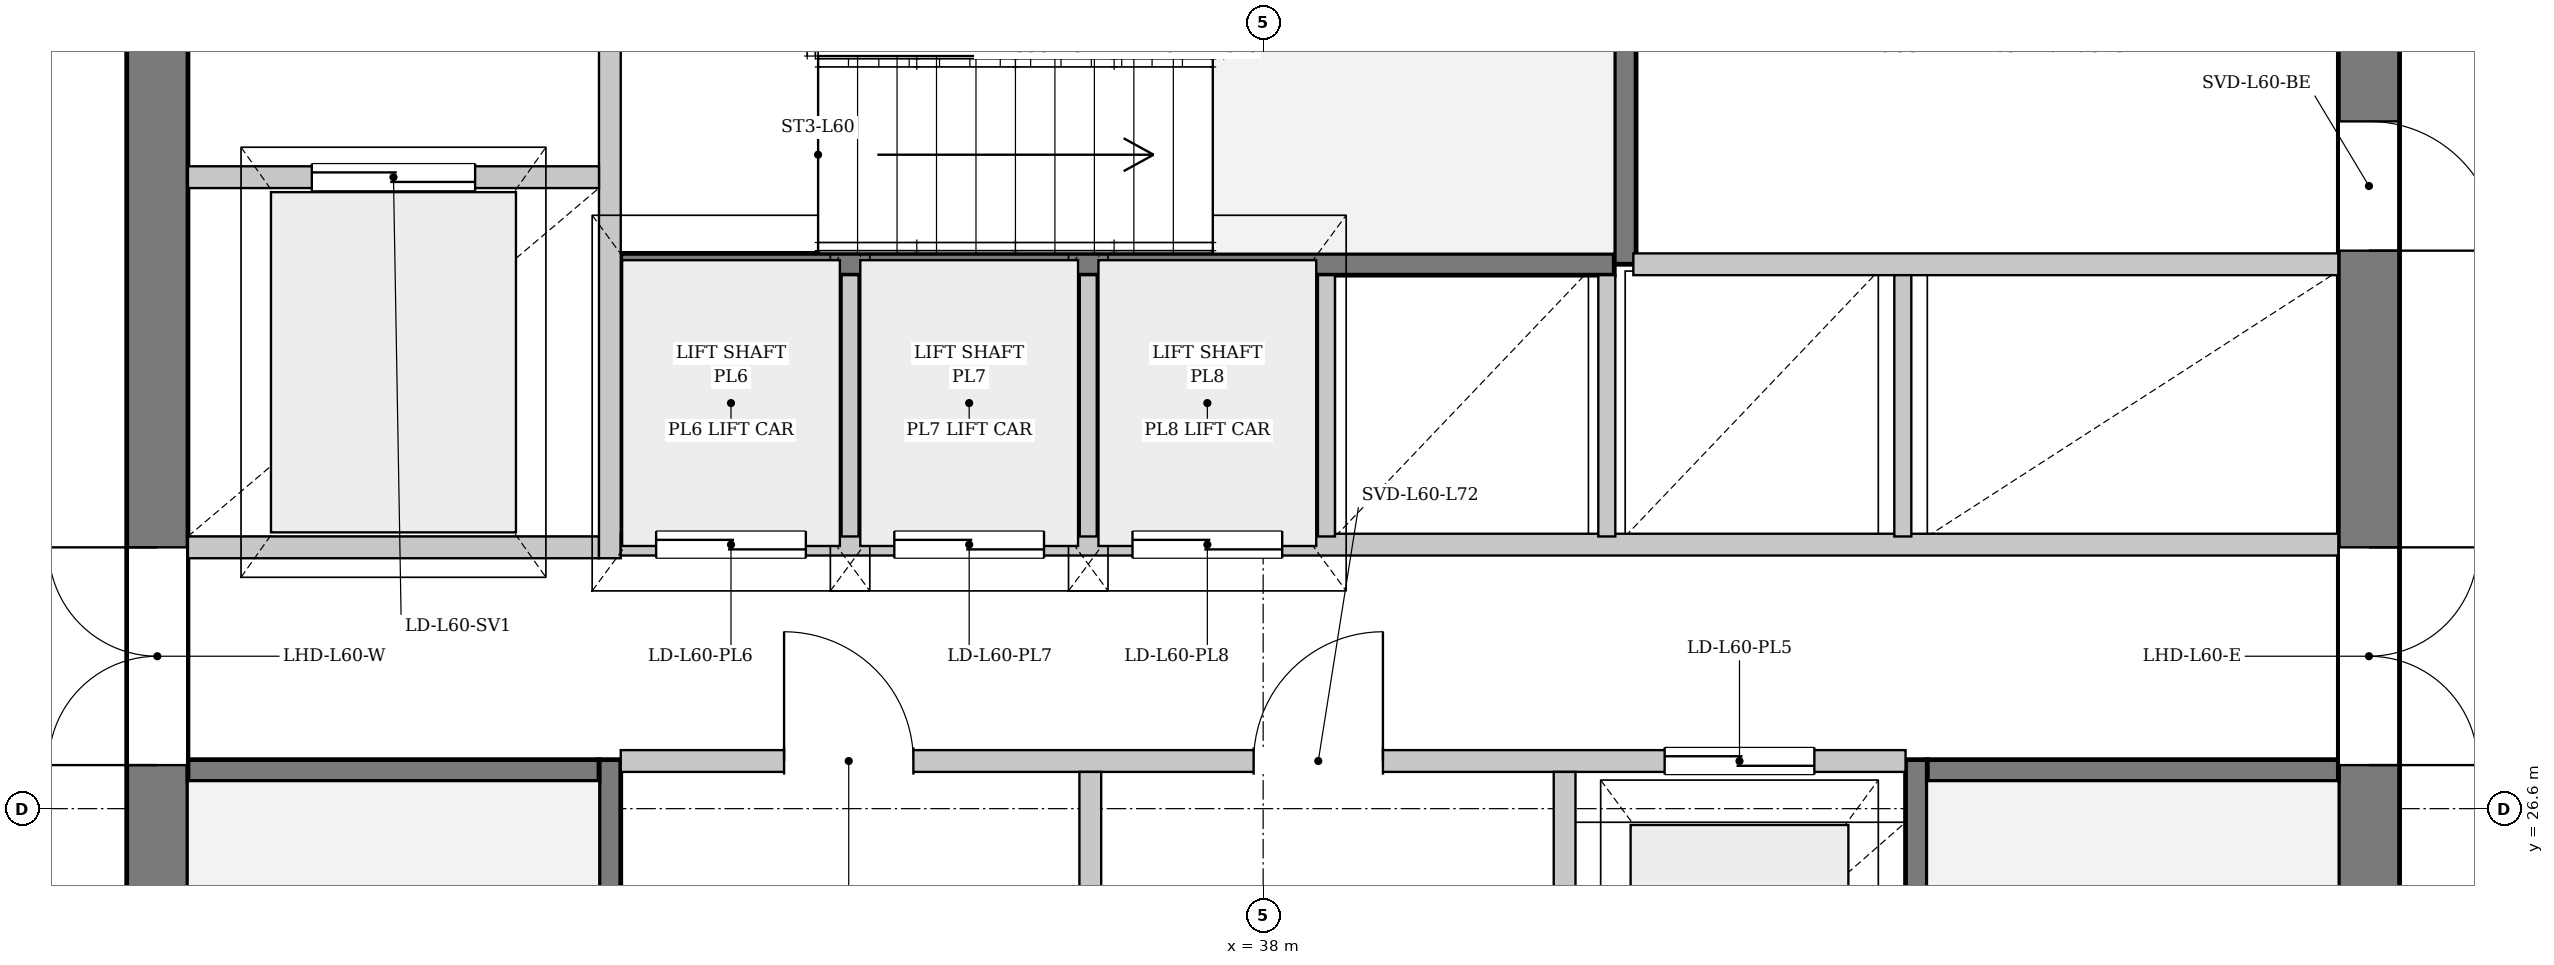
"""IFC4 building model, lengths in metres.
Left out: names, types, materials, properties, quantities, classifications, styles, units other than length and angle.
Written with IfcOpenShell. Run it as: python <this file> out.ifc"""

import sys

from ifc_helpers import new_model, si_unit, direction, frame, frame_2d, origin, place, context, subcontext, project, spatial, rectangle, extrude, source, transform, mapped, element, fill, save


model = new_model("IFC4")
c1 = context("Model", 3, precision=1e-05, world=origin(), true_north=direction((0.0, 1.0)))
c2 = subcontext(c1, "Body", "Model", "MODEL_VIEW")
j1 = project(units=[si_unit("LENGTHUNIT", "METRE"), si_unit("PLANEANGLEUNIT", "RADIAN")], contexts=[c1])
p1 = place(None, origin())
s1 = spatial("IfcSite", under=j1, at=p1, CompositionType="ELEMENT")
p2 = place(p1, origin())
s2 = spatial("IfcBuilding", under=s1, at=p2, CompositionType="ELEMENT")
p3 = place(p2, frame((0.0, 0.0, 227.35)))
s3 = spatial("IfcBuildingStorey", under=s2, at=p3, CompositionType="ELEMENT", Elevation=227.35)
p4 = place(p3, frame((15.539, 30.776, 0.0), z_axis=(0.0, 0.0, 1.0), x_axis=(0.876021364286, 0.482272297892, 0.0)))
e1 = element("IfcWall", 1, at=p4, inside=s3, PredefinedType="SOLIDWALL", context=c2, shape_type="SweptSolid", body=[
    extrude(rectangle(XDim=22.397, YDim=0.38, at=frame_2d((11.199, 0.0))), origin(), (0.0, 0.0, 1.0), 2.822),
])
p5 = place(p4, frame((5.671, 0.0, 0.65)))
e2 = element("IfcOpeningElement", 2, at=p5, cuts=e1, PredefinedType="OPENING", context=c2, shape_type="SweptSolid", body=[
    extrude(rectangle(XDim=1.2, YDim=1.5, at=frame_2d((0.6, 0.75))), frame((0.0, 0.2, 0.0), z_axis=(0.0, -1.0, 0.0), x_axis=(1.0, 0.0, 0.0)), (0.0, 0.0, 1.0), 0.4),
])
p6 = place(p4, frame((15.526, 0.0, 0.65)))
e3 = element("IfcOpeningElement", 3, at=p6, cuts=e1, PredefinedType="OPENING", context=c2, shape_type="SweptSolid", body=[
    extrude(rectangle(XDim=1.2, YDim=1.5, at=frame_2d((0.6, 0.75))), frame((0.0, 0.2, 0.0), z_axis=(0.0, -1.0, 0.0), x_axis=(1.0, 0.0, 0.0)), (0.0, 0.0, 1.0), 0.4),
])
p7 = place(p3, frame((29.875, 19.5, 0.0), z_axis=(0.0, 0.0, 1.0), x_axis=(0.0, 1.0, 0.0)))
e4 = element("IfcWall", 4, at=p7, inside=s3, PredefinedType="SHEAR", context=c2, shape_type="SweptSolid", body=[
    extrude(rectangle(XDim=14.2, YDim=0.45, at=frame_2d((7.1, 0.0))), origin(), (0.0, 0.0, 1.0), 3.33),
])
p8 = place(p7, frame((7.42, 0.0, 0.0)))
e5 = element("IfcOpeningElement", 5, at=p8, cuts=e4, PredefinedType="OPENING", context=c2, shape_type="SweptSolid", body=[
    extrude(rectangle(XDim=1.6, YDim=2.2, at=frame_2d((0.8, 1.1))), frame((0.0, 0.235, 0.0), z_axis=(0.0, -1.0, 0.0), x_axis=(1.0, 0.0, 0.0)), (0.0, 0.0, 1.0), 0.47),
])
p9 = place(p3, frame((46.125, 33.7, 0.0), z_axis=(0.0, 0.0, 1.0), x_axis=(0.0, -1.0, 0.0)))
e6 = element("IfcWall", 6, at=p9, inside=s3, PredefinedType="SHEAR", context=c2, shape_type="SweptSolid", body=[
    extrude(rectangle(XDim=14.2, YDim=0.45, at=frame_2d((7.1, 0.0))), origin(), (0.0, 0.0, 1.0), 3.33),
])
p10 = place(p9, frame((5.18, 0.0, 0.0)))
e7 = element("IfcOpeningElement", 7, at=p10, cuts=e6, PredefinedType="OPENING", context=c2, shape_type="SweptSolid", body=[
    extrude(rectangle(XDim=1.6, YDim=2.2, at=frame_2d((0.8, 1.1))), frame((0.0, 0.235, 0.0), z_axis=(0.0, -1.0, 0.0), x_axis=(1.0, 0.0, 0.0)), (0.0, 0.0, 1.0), 0.47),
])
p11 = place(p9, frame((2.05, 0.0, 0.0)))
e8 = element("IfcOpeningElement", 8, at=p11, cuts=e6, PredefinedType="OPENING", context=c2, shape_type="SweptSolid", body=[
    extrude(rectangle(XDim=0.95, YDim=2.1, at=frame_2d((0.475, 1.05))), frame((0.0, 0.235, 0.0), z_axis=(0.0, -1.0, 0.0), x_axis=(1.0, 0.0, 0.0)), (0.0, 0.0, 1.0), 0.47),
])
p12 = place(p3, frame((33.2, 19.5, 0.0), z_axis=(0.0, 0.0, 1.0), x_axis=(0.0, 1.0, 0.0)))
e9 = element("IfcWall", 9, at=p12, inside=s3, PredefinedType="PARTITIONING", context=c2, shape_type="SweptSolid", body=[
    extrude(rectangle(XDim=7.46, YDim=0.16, at=frame_2d((3.73, 0.0))), origin(), (0.0, 0.0, 1.0), 3.33),
])
p13 = place(p12, frame((0.08, 0.0, 0.0)))
e10 = element("IfcOpeningElement", 10, at=p13, cuts=e9, PredefinedType="OPENING", context=c2, shape_type="SweptSolid", body=[
    extrude(rectangle(XDim=1.32, YDim=2.2, at=frame_2d((0.66, 1.1))), frame((0.0, 0.09, 0.0), z_axis=(0.0, -1.0, 0.0), x_axis=(1.0, 0.0, 0.0)), (0.0, 0.0, 1.0), 0.18),
])
p14 = place(p3, frame((30.1, 26.88, 0.0), z_axis=(0.0, 0.0, 1.0), x_axis=(1.0, 0.0, 0.0)))
e11 = element("IfcWall", 11, at=p14, inside=s3, PredefinedType="PARTITIONING", context=c2, shape_type="SweptSolid", body=[
    extrude(rectangle(XDim=3.02, YDim=0.16, at=frame_2d((1.51, 0.0))), origin(), (0.0, 0.0, 1.0), 3.33),
])
p15 = place(p3, frame((42.8, 26.96, 0.0), z_axis=(0.0, 0.0, 1.0), x_axis=(0.0, -1.0, 0.0)))
e12 = element("IfcWall", 12, at=p15, inside=s3, PredefinedType="PARTITIONING", context=c2, shape_type="SweptSolid", body=[
    extrude(rectangle(XDim=7.46, YDim=0.16, at=frame_2d((3.73, 0.0))), origin(), (0.0, 0.0, 1.0), 3.33),
])
p16 = place(p15, frame((6.06, 0.0, 0.0)))
e13 = element("IfcOpeningElement", 13, at=p16, cuts=e12, PredefinedType="OPENING", context=c2, shape_type="SweptSolid", body=[
    extrude(rectangle(XDim=1.32, YDim=2.2, at=frame_2d((0.66, 1.1))), frame((0.0, 0.09, 0.0), z_axis=(0.0, -1.0, 0.0), x_axis=(1.0, 0.0, 0.0)), (0.0, 0.0, 1.0), 0.18),
])
p17 = place(p3, frame((42.88, 26.88, 0.0), z_axis=(0.0, 0.0, 1.0), x_axis=(1.0, 0.0, 0.0)))
e14 = element("IfcWall", 14, at=p17, inside=s3, PredefinedType="PARTITIONING", context=c2, shape_type="SweptSolid", body=[
    extrude(rectangle(XDim=3.02, YDim=0.16, at=frame_2d((1.51, 0.0))), origin(), (0.0, 0.0, 1.0), 3.33),
])
p18 = place(p3, frame((33.28, 30.6, 0.0), z_axis=(0.0, 0.0, 1.0), x_axis=(1.0, 0.0, 0.0)))
e15 = element("IfcWall", 15, at=p18, inside=s3, PredefinedType="PARTITIONING", context=c2, shape_type="SweptSolid", body=[
    extrude(rectangle(XDim=7.3, YDim=0.16, at=frame_2d((3.65, 0.0))), origin(), (0.0, 0.0, 1.0), 3.33),
])
p19 = place(p3, frame((40.66, 30.6, 0.0), z_axis=(0.0, 0.0, 1.0), x_axis=(0.0, 1.0, 0.0)))
e16 = element("IfcWall", 16, at=p19, inside=s3, PredefinedType="PARTITIONING", context=c2, shape_type="SweptSolid", body=[
    extrude(rectangle(XDim=3.1, YDim=0.16, at=frame_2d((1.55, 0.0))), origin(), (0.0, 0.0, 1.0), 3.33),
])
p20 = place(p3, frame((30.1, 28.52, 0.0), z_axis=(0.0, 0.0, 1.0), x_axis=(1.0, 0.0, 0.0)))
e17 = element("IfcWall", 17, at=p20, inside=s3, PredefinedType="PARTITIONING", context=c2, shape_type="SweptSolid", body=[
    extrude(rectangle(XDim=3.02, YDim=0.16, at=frame_2d((1.51, 0.0))), origin(), (0.0, 0.0, 1.0), 3.33),
])
p21 = place(p3, frame((33.2, 28.44, 0.0), z_axis=(0.0, 0.0, 1.0), x_axis=(0.0, 1.0, 0.0)))
e18 = element("IfcWall", 18, at=p21, inside=s3, PredefinedType="PARTITIONING", context=c2, shape_type="SweptSolid", body=[
    extrude(rectangle(XDim=5.26, YDim=0.16, at=frame_2d((2.63, 0.0))), origin(), (0.0, 0.0, 1.0), 3.33),
])
p22 = place(p3, frame((30.1, 31.24, 0.0), z_axis=(0.0, 0.0, 1.0), x_axis=(1.0, 0.0, 0.0)))
e19 = element("IfcWall", 19, at=p22, inside=s3, PredefinedType="PARTITIONING", context=c2, shape_type="SweptSolid", body=[
    extrude(rectangle(XDim=3.02, YDim=0.16, at=frame_2d((1.51, 0.0))), origin(), (0.0, 0.0, 1.0), 3.33),
])
p23 = place(p22, frame((0.91, 0.0, 0.0)))
e20 = element("IfcOpeningElement", 20, at=p23, cuts=e19, PredefinedType="OPENING", context=c2, shape_type="SweptSolid", body=[
    extrude(rectangle(XDim=1.2, YDim=2.2, at=frame_2d((0.6, 1.1))), frame((0.0, 0.09, 0.0), z_axis=(0.0, -1.0, 0.0), x_axis=(1.0, 0.0, 0.0)), (0.0, 0.0, 1.0), 0.18),
])
p24 = place(p3, frame((33.28, 26.95, 0.0), z_axis=(0.0, 0.0, 1.0), x_axis=(1.0, 0.0, 0.0)))
e21 = element("IfcWall", 21, at=p24, inside=s3, PredefinedType="PARTITIONING", context=c2, shape_type="SweptSolid", body=[
    extrude(rectangle(XDim=9.44, YDim=0.16, at=frame_2d((4.72, 0.0))), origin(), (0.0, 0.0, 1.0), 3.33),
])
p25 = place(p24, frame((1.2, 0.0, 0.0)))
e22 = element("IfcOpeningElement", 22, at=p25, cuts=e21, PredefinedType="OPENING", context=c2, shape_type="SweptSolid", body=[
    extrude(rectangle(XDim=0.95, YDim=2.1, at=frame_2d((0.475, 1.05))), frame((0.0, 0.09, 0.0), z_axis=(0.0, -1.0, 0.0), x_axis=(1.0, 0.0, 0.0)), (0.0, 0.0, 1.0), 0.18),
])
p26 = place(p24, frame((4.65, 0.0, 0.0)))
e23 = element("IfcOpeningElement", 23, at=p26, cuts=e21, PredefinedType="OPENING", context=c2, shape_type="SweptSolid", body=[
    extrude(rectangle(XDim=0.95, YDim=2.1, at=frame_2d((0.475, 1.05))), frame((0.0, 0.09, 0.0), z_axis=(0.0, -1.0, 0.0), x_axis=(1.0, 0.0, 0.0)), (0.0, 0.0, 1.0), 0.18),
])
p27 = place(p24, frame((7.67, 0.0, 0.0)))
e24 = element("IfcOpeningElement", 24, at=p27, cuts=e21, PredefinedType="OPENING", context=c2, shape_type="SweptSolid", body=[
    extrude(rectangle(XDim=1.1, YDim=2.2, at=frame_2d((0.55, 1.1))), frame((0.0, 0.09, 0.0), z_axis=(0.0, -1.0, 0.0), x_axis=(1.0, 0.0, 0.0)), (0.0, 0.0, 1.0), 0.18),
])
for number, where, z_axis, x_axis in (
    (25, (36.73, 24.56, 0.0), (0.0, 0.0, 1.0), (0.0, 1.0, 0.0)),
    (26, (40.215, 24.56, 0.0), (0.0, 0.0, 1.0), (0.0, 1.0, 0.0)),
):
    element("IfcWall", number, at=place(p3, frame(where, z_axis=z_axis, x_axis=x_axis)), inside=s3, PredefinedType="PARTITIONING", context=c2, shape_type="SweptSolid", body=[
        extrude(rectangle(XDim=2.31, YDim=0.16, at=frame_2d((1.155, 0.0))), origin(), (0.0, 0.0, 1.0), 3.33),
    ])
p28 = place(p3, frame((33.28, 28.54, 0.0), z_axis=(0.0, 0.0, 1.0), x_axis=(1.0, 0.0, 0.0)))
e27 = element("IfcWall", 27, at=p28, inside=s3, PredefinedType="PARTITIONING", context=c2, shape_type="SweptSolid", body=[
    extrude(rectangle(XDim=12.62, YDim=0.16, at=frame_2d((6.31, 0.0))), origin(), (0.0, 0.0, 1.0), 3.33),
])
p29 = place(p28, frame((0.26, 0.0, 0.0)))
e28 = element("IfcOpeningElement", 28, at=p29, cuts=e27, PredefinedType="OPENING", context=c2, shape_type="SweptSolid", body=[
    extrude(rectangle(XDim=1.1, YDim=2.2, at=frame_2d((0.55, 1.1))), frame((0.0, 0.09, 0.0), z_axis=(0.0, -1.0, 0.0), x_axis=(1.0, 0.0, 0.0)), (0.0, 0.0, 1.0), 0.18),
])
p30 = place(p28, frame((2.01, 0.0, 0.0)))
e29 = element("IfcOpeningElement", 29, at=p30, cuts=e27, PredefinedType="OPENING", context=c2, shape_type="SweptSolid", body=[
    extrude(rectangle(XDim=1.1, YDim=2.2, at=frame_2d((0.55, 1.1))), frame((0.0, 0.09, 0.0), z_axis=(0.0, -1.0, 0.0), x_axis=(1.0, 0.0, 0.0)), (0.0, 0.0, 1.0), 0.18),
])
p31 = place(p28, frame((3.76, 0.0, 0.0)))
e30 = element("IfcOpeningElement", 30, at=p31, cuts=e27, PredefinedType="OPENING", context=c2, shape_type="SweptSolid", body=[
    extrude(rectangle(XDim=1.1, YDim=2.2, at=frame_2d((0.55, 1.1))), frame((0.0, 0.09, 0.0), z_axis=(0.0, -1.0, 0.0), x_axis=(1.0, 0.0, 0.0)), (0.0, 0.0, 1.0), 0.18),
])
p32 = place(p3, frame((40.72, 30.6, 0.0), z_axis=(0.0, 0.0, 1.0), x_axis=(1.0, 0.0, 0.0)))
e31 = element("IfcWall", 31, at=p32, inside=s3, PredefinedType="PARTITIONING", context=c2, shape_type="SweptSolid", body=[
    extrude(rectangle(XDim=5.18, YDim=0.16, at=frame_2d((2.59, 0.0))), origin(), (0.0, 0.0, 1.0), 3.33),
])
for number, where, z_axis, x_axis in (
    (32, (34.965, 28.6, 0.0), (0.0, 0.0, 1.0), (0.0, 1.0, 0.0)),
    (33, (36.715, 28.6, 0.0), (0.0, 0.0, 1.0), (0.0, 1.0, 0.0)),
    (34, (38.465, 28.6, 0.0), (0.0, 0.0, 1.0), (0.0, 1.0, 0.0)),
    (35, (40.525, 28.6, 0.0), (0.0, 0.0, 1.0), (0.0, 1.0, 0.0)),
    (36, (42.7, 28.6, 0.0), (0.0, 0.0, 1.0), (0.0, 1.0, 0.0)),
):
    element("IfcWall", number, at=place(p3, frame(where, z_axis=z_axis, x_axis=x_axis)), inside=s3, PredefinedType="PARTITIONING", context=c2, shape_type="SweptSolid", body=[
        extrude(rectangle(XDim=1.92, YDim=0.125, at=frame_2d((0.96, 0.0))), origin(), (0.0, 0.0, 1.0), 3.33),
    ])
m1 = source(origin(), c2, "Body", "SweptSolid", [
    extrude(rectangle(XDim=1.6, YDim=2.2, at=frame_2d((0.8, 1.1))), frame((0.0, 0.025, 0.0), z_axis=(0.0, -1.0, 0.0), x_axis=(1.0, 0.0, 0.0)), (0.0, 0.0, 1.0), 0.05),
])
p33 = place(p8, origin())
e37 = element("IfcDoor", 37, at=p33, inside=s3, OperationType="DOUBLE_DOOR_SINGLE_SWING", PredefinedType="DOOR", context=c2, shape_type="MappedRepresentation", body=[
    mapped(m1, transform((0.0, 0.0, 0.0), x_axis=(1.0, 0.0, 0.0), y_axis=(0.0, 1.0, 0.0), z_axis=(0.0, 0.0, 1.0), scale=1.0)),
])
fill(e5, e37)
p34 = place(p10, origin())
e38 = element("IfcDoor", 38, at=p34, inside=s3, OperationType="DOUBLE_DOOR_SINGLE_SWING", PredefinedType="DOOR", context=c2, shape_type="MappedRepresentation", body=[
    mapped(m1, transform((0.0, 0.0, 0.0), x_axis=(1.0, 0.0, 0.0), y_axis=(0.0, 1.0, 0.0), z_axis=(0.0, 0.0, 1.0), scale=1.0)),
])
fill(e7, e38)
m2 = source(origin(), c2, "Body", "SweptSolid", [
    extrude(rectangle(XDim=1.2, YDim=2.2, at=frame_2d((0.6, 1.1))), frame((0.0, 0.025, 0.0), z_axis=(0.0, -1.0, 0.0), x_axis=(1.0, 0.0, 0.0)), (0.0, 0.0, 1.0), 0.05),
])
p35 = place(p23, origin())
e39 = element("IfcDoor", 39, at=p35, inside=s3, OperationType="DOUBLE_DOOR_SLIDING", PredefinedType="DOOR", context=c2, shape_type="MappedRepresentation", body=[
    mapped(m2, transform((0.0, 0.0, 0.0), x_axis=(1.0, 0.0, 0.0), y_axis=(0.0, 1.0, 0.0), z_axis=(0.0, 0.0, 1.0), scale=1.0)),
])
fill(e20, e39)
m3 = source(origin(), c2, "Body", "SweptSolid", [
    extrude(rectangle(XDim=0.95, YDim=2.1, at=frame_2d((0.475, 1.05))), frame((0.0, 0.025, 0.0), z_axis=(0.0, -1.0, 0.0), x_axis=(1.0, 0.0, 0.0)), (0.0, 0.0, 1.0), 0.05),
])
p36 = place(p25, origin())
e40 = element("IfcDoor", 40, at=p36, inside=s3, OperationType="SINGLE_SWING_LEFT", PredefinedType="DOOR", context=c2, shape_type="MappedRepresentation", body=[
    mapped(m3, transform((0.0, 0.0, 0.0), x_axis=(1.0, 0.0, 0.0), y_axis=(0.0, 1.0, 0.0), z_axis=(0.0, 0.0, 1.0), scale=1.0)),
])
fill(e22, e40)
p37 = place(p26, origin())
e41 = element("IfcDoor", 41, at=p37, inside=s3, OperationType="SINGLE_SWING_RIGHT", PredefinedType="DOOR", context=c2, shape_type="MappedRepresentation", body=[
    mapped(m3, transform((0.0, 0.0, 0.0), x_axis=(1.0, 0.0, 0.0), y_axis=(0.0, 1.0, 0.0), z_axis=(0.0, 0.0, 1.0), scale=1.0)),
])
fill(e23, e41)
m4 = source(origin(), c2, "Body", "SweptSolid", [
    extrude(rectangle(XDim=1.1, YDim=2.2, at=frame_2d((0.55, 1.1))), frame((0.0, 0.025, 0.0), z_axis=(0.0, -1.0, 0.0), x_axis=(1.0, 0.0, 0.0)), (0.0, 0.0, 1.0), 0.05),
])
p38 = place(p27, origin())
e42 = element("IfcDoor", 42, at=p38, inside=s3, OperationType="DOUBLE_DOOR_SLIDING", PredefinedType="DOOR", context=c2, shape_type="MappedRepresentation", body=[
    mapped(m4, transform((0.0, 0.0, 0.0), x_axis=(1.0, 0.0, 0.0), y_axis=(0.0, 1.0, 0.0), z_axis=(0.0, 0.0, 1.0), scale=1.0)),
])
fill(e24, e42)
p39 = place(p29, origin())
e43 = element("IfcDoor", 43, at=p39, inside=s3, OperationType="DOUBLE_DOOR_SLIDING", PredefinedType="DOOR", context=c2, shape_type="MappedRepresentation", body=[
    mapped(m4, transform((0.0, 0.0, 0.0), x_axis=(1.0, 0.0, 0.0), y_axis=(0.0, 1.0, 0.0), z_axis=(0.0, 0.0, 1.0), scale=1.0)),
])
fill(e28, e43)
p40 = place(p30, origin())
e44 = element("IfcDoor", 44, at=p40, inside=s3, OperationType="DOUBLE_DOOR_SLIDING", PredefinedType="DOOR", context=c2, shape_type="MappedRepresentation", body=[
    mapped(m4, transform((0.0, 0.0, 0.0), x_axis=(1.0, 0.0, 0.0), y_axis=(0.0, 1.0, 0.0), z_axis=(0.0, 0.0, 1.0), scale=1.0)),
])
fill(e29, e44)
p41 = place(p31, origin())
e45 = element("IfcDoor", 45, at=p41, inside=s3, OperationType="DOUBLE_DOOR_SLIDING", PredefinedType="DOOR", context=c2, shape_type="MappedRepresentation", body=[
    mapped(m4, transform((0.0, 0.0, 0.0), x_axis=(1.0, 0.0, 0.0), y_axis=(0.0, 1.0, 0.0), z_axis=(0.0, 0.0, 1.0), scale=1.0)),
])
fill(e30, e45)
p42 = place(p11, origin())
e46 = element("IfcDoor", 46, at=p42, inside=s3, OperationType="SINGLE_SWING_RIGHT", PredefinedType="DOOR", context=c2, shape_type="MappedRepresentation", body=[
    mapped(m3, transform((0.0, 0.0, 0.0), x_axis=(1.0, 0.0, 0.0), y_axis=(0.0, 1.0, 0.0), z_axis=(0.0, 0.0, 1.0), scale=1.0)),
])
fill(e8, e46)
save(model, sys.argv[1])
